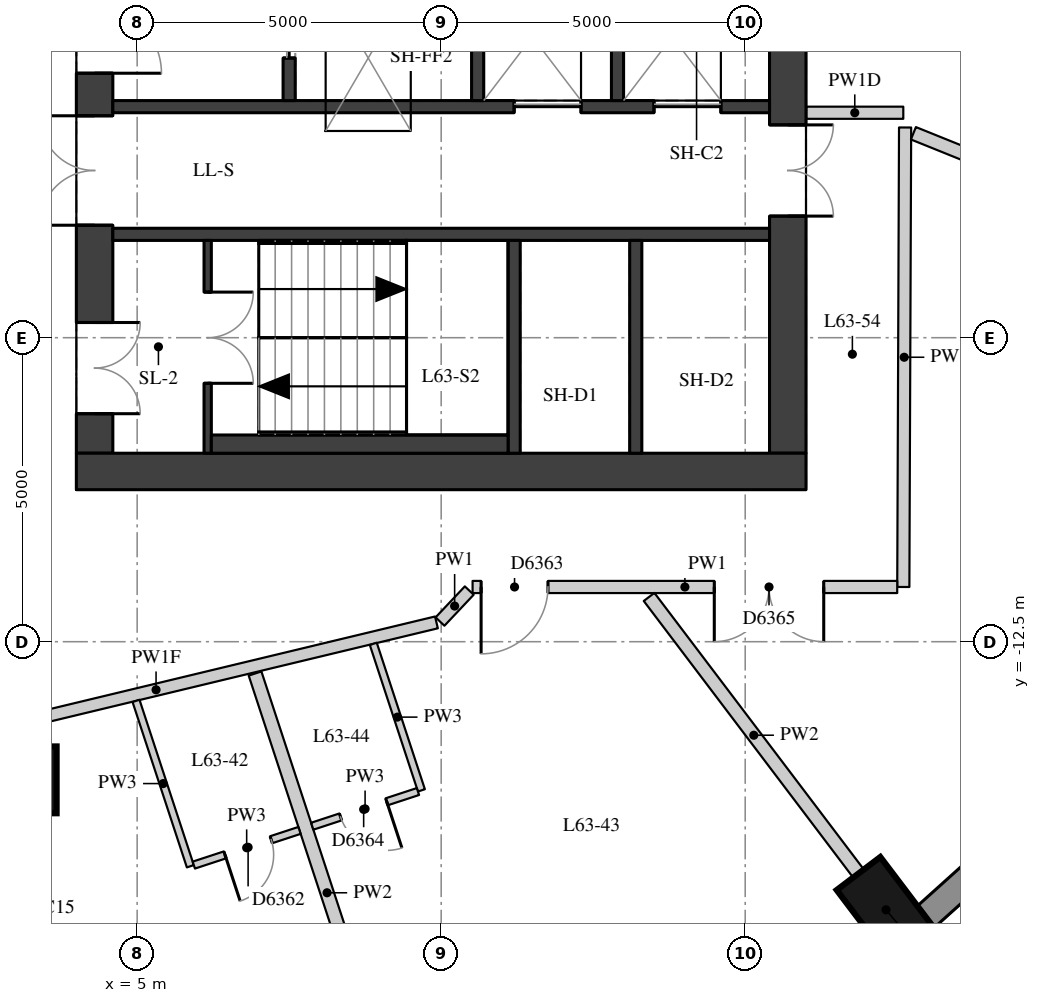
"""IFC4 building model, lengths in metres.
Left out: names, types, materials, properties, quantities, classifications, styles, units other than length and angle.
Written with IfcOpenShell. Run it as: python <this file> out.ifc"""

import sys

from ifc_helpers import new_model, si_unit, direction, frame, frame_2d, origin, origin_2d, place, context, subcontext, project, spatial, rectangle, extrude, element, fill, save


model = new_model("IFC4")
c1 = context("Model", 3, precision=1e-05, world=origin(), true_north=direction((0.0, 1.0)))
c2 = subcontext(c1, "Body", "Model", "MODEL_VIEW")
j1 = project(units=[si_unit("LENGTHUNIT", "METRE"), si_unit("PLANEANGLEUNIT", "RADIAN")], contexts=[c1])
p1 = place(None, origin())
s1 = spatial("IfcSite", under=j1, at=p1, CompositionType="ELEMENT")
p2 = place(p1, origin())
s2 = spatial("IfcBuilding", under=s1, at=p2, CompositionType="ELEMENT")
p3 = place(p2, frame((0.0, 0.0, 222.2)))
s3 = spatial("IfcBuildingStorey", under=s2, at=p3, CompositionType="ELEMENT", Elevation=222.2)
p4 = place(p3, frame((17.316, -16.911, 0.0), z_axis=(0.0, 0.0, 1.0), x_axis=(0.60360770772, -0.797281465469, 0.0)))
e1 = element("IfcColumn", 1, at=p4, inside=s3, PredefinedType="COLUMN", context=c2, shape_type="SweptSolid", body=[
    extrude(rectangle(XDim=1.5, YDim=0.9, at=origin_2d()), origin(), (0.0, 0.0, 1.0), 3.3),
])
p5 = place(p3, frame((3.126, -14.772, 0.0), z_axis=(0.0, 0.0, 1.0), x_axis=(1.0, 0.0, 0.0)))
e2 = element("IfcColumn", 2, at=p5, inside=s3, PredefinedType="COLUMN", context=c2, shape_type="SweptSolid", body=[
    extrude(rectangle(XDim=1.1, YDim=1.1, at=origin_2d()), origin(), (0.0, 0.0, 1.0), 3.3),
])
p6 = place(p3, frame((17.953, -17.04, 0.0), z_axis=(0.0, 0.0, 1.0), x_axis=(0.743442727602, 0.668799604348, 0.0)))
e3 = element("IfcWall", 3, at=p6, inside=s3, PredefinedType="SOLIDWALL", context=c2, shape_type="SweptSolid", body=[
    extrude(rectangle(XDim=3.513, YDim=0.45, at=frame_2d((1.756, 0.0))), origin(), (0.0, 0.0, 1.0), 3.02),
])
p7 = place(p3, frame((4.3, -9.4, 0.0), z_axis=(0.0, 0.0, 1.0), x_axis=(0.0, 1.0, 0.0)))
e4 = element("IfcWall", 4, at=p7, inside=s3, PredefinedType="SHEAR", context=c2, shape_type="SweptSolid", body=[
    extrude(rectangle(XDim=18.8, YDim=0.6, at=frame_2d((9.4, 0.0))), origin(), (0.0, 0.0, 1.0), 3.02),
])
p8 = place(p7, frame((0.65, 0.0, 0.0)))
e5 = element("IfcOpeningElement", 5, at=p8, cuts=e4, PredefinedType="OPENING", context=c2, shape_type="SweptSolid", body=[
    extrude(rectangle(XDim=1.5, YDim=2.1, at=frame_2d((0.75, 1.05))), frame((0.0, 0.31, 0.0), z_axis=(0.0, -1.0, 0.0), x_axis=(1.0, 0.0, 0.0)), (0.0, 0.0, 1.0), 0.62),
])
p9 = place(p7, frame((3.75, 0.0, 0.0)))
e6 = element("IfcOpeningElement", 6, at=p9, cuts=e4, PredefinedType="OPENING", context=c2, shape_type="SweptSolid", body=[
    extrude(rectangle(XDim=1.8, YDim=2.1, at=frame_2d((0.9, 1.05))), frame((0.0, 0.31, 0.0), z_axis=(0.0, -1.0, 0.0), x_axis=(1.0, 0.0, 0.0)), (0.0, 0.0, 1.0), 0.62),
])
p10 = place(p7, frame((6.25, 0.0, 0.0)))
e7 = element("IfcOpeningElement", 7, at=p10, cuts=e4, PredefinedType="OPENING", context=c2, shape_type="SweptSolid", body=[
    extrude(rectangle(XDim=1.1, YDim=2.1, at=frame_2d((0.55, 1.05))), frame((0.0, 0.31, 0.0), z_axis=(0.0, -1.0, 0.0), x_axis=(1.0, 0.0, 0.0)), (0.0, 0.0, 1.0), 0.62),
])
p11 = place(p7, frame((8.9, 0.0, 0.0)))
e8 = element("IfcOpeningElement", 8, at=p11, cuts=e4, PredefinedType="OPENING", context=c2, shape_type="SweptSolid", body=[
    extrude(rectangle(XDim=1.0, YDim=2.1, at=frame_2d((0.5, 1.05))), frame((0.0, 0.31, 0.0), z_axis=(0.0, -1.0, 0.0), x_axis=(1.0, 0.0, 0.0)), (0.0, 0.0, 1.0), 0.62),
])
p12 = place(p7, frame((11.45, 0.0, 0.0)))
e9 = element("IfcOpeningElement", 9, at=p12, cuts=e4, PredefinedType="OPENING", context=c2, shape_type="SweptSolid", body=[
    extrude(rectangle(XDim=1.1, YDim=2.1, at=frame_2d((0.55, 1.05))), frame((0.0, 0.31, 0.0), z_axis=(0.0, -1.0, 0.0), x_axis=(1.0, 0.0, 0.0)), (0.0, 0.0, 1.0), 0.62),
])
p13 = place(p7, frame((13.25, 0.0, 0.0)))
e10 = element("IfcOpeningElement", 10, at=p13, cuts=e4, PredefinedType="OPENING", context=c2, shape_type="SweptSolid", body=[
    extrude(rectangle(XDim=1.8, YDim=2.1, at=frame_2d((0.9, 1.05))), frame((0.0, 0.31, 0.0), z_axis=(0.0, -1.0, 0.0), x_axis=(1.0, 0.0, 0.0)), (0.0, 0.0, 1.0), 0.62),
])
p14 = place(p7, frame((16.65, 0.0, 0.0)))
e11 = element("IfcOpeningElement", 11, at=p14, cuts=e4, PredefinedType="OPENING", context=c2, shape_type="SweptSolid", body=[
    extrude(rectangle(XDim=1.5, YDim=2.1, at=frame_2d((0.75, 1.05))), frame((0.0, 0.31, 0.0), z_axis=(0.0, -1.0, 0.0), x_axis=(1.0, 0.0, 0.0)), (0.0, 0.0, 1.0), 0.62),
])
p15 = place(p3, frame((15.7, -9.4, 0.0), z_axis=(0.0, 0.0, 1.0), x_axis=(0.0, 1.0, 0.0)))
e12 = element("IfcWall", 12, at=p15, inside=s3, PredefinedType="SHEAR", context=c2, shape_type="SweptSolid", body=[
    extrude(rectangle(XDim=18.8, YDim=0.6, at=frame_2d((9.4, 0.0))), origin(), (0.0, 0.0, 1.0), 3.02),
])
p16 = place(p15, frame((13.4, 0.0, 0.0)))
e13 = element("IfcOpeningElement", 13, at=p16, cuts=e12, PredefinedType="OPENING", context=c2, shape_type="SweptSolid", body=[
    extrude(rectangle(XDim=1.5, YDim=2.1, at=frame_2d((0.75, 1.05))), frame((0.0, 0.31, 0.0), z_axis=(0.0, -1.0, 0.0), x_axis=(1.0, 0.0, 0.0)), (0.0, 0.0, 1.0), 0.62),
])
p17 = place(p15, frame((3.9, 0.0, 0.0)))
e14 = element("IfcOpeningElement", 14, at=p17, cuts=e12, PredefinedType="OPENING", context=c2, shape_type="SweptSolid", body=[
    extrude(rectangle(XDim=1.5, YDim=2.1, at=frame_2d((0.75, 1.05))), frame((0.0, 0.31, 0.0), z_axis=(0.0, -1.0, 0.0), x_axis=(1.0, 0.0, 0.0)), (0.0, 0.0, 1.0), 0.62),
])
p18 = place(p3, frame((4.0, -9.7, 0.0), z_axis=(0.0, 0.0, 1.0), x_axis=(1.0, 0.0, 0.0)))
e15 = element("IfcWall", 15, at=p18, inside=s3, PredefinedType="SHEAR", context=c2, shape_type="SweptSolid", body=[
    extrude(rectangle(XDim=12.0, YDim=0.6, at=frame_2d((6.0, 0.0))), origin(), (0.0, 0.0, 1.0), 3.02),
])
p19 = place(p3, frame((4.6, -3.7, 0.0), z_axis=(0.0, 0.0, 1.0), x_axis=(1.0, 0.0, 0.0)))
e16 = element("IfcWall", 16, at=p19, inside=s3, PredefinedType="SHEAR", context=c2, shape_type="SweptSolid", body=[
    extrude(rectangle(XDim=10.8, YDim=0.2, at=frame_2d((5.4, 0.0))), origin(), (0.0, 0.0, 1.0), 3.02),
])
p20 = place(p19, frame((6.6, 0.0, 0.0)))
e17 = element("IfcOpeningElement", 17, at=p20, cuts=e16, PredefinedType="OPENING", context=c2, shape_type="SweptSolid", body=[
    extrude(rectangle(XDim=1.1, YDim=2.1, at=frame_2d((0.55, 1.05))), frame((0.0, 0.11, 0.0), z_axis=(0.0, -1.0, 0.0), x_axis=(1.0, 0.0, 0.0)), (0.0, 0.0, 1.0), 0.22),
])
p21 = place(p19, frame((8.9, 0.0, 0.0)))
e18 = element("IfcOpeningElement", 18, at=p21, cuts=e16, PredefinedType="OPENING", context=c2, shape_type="SweptSolid", body=[
    extrude(rectangle(XDim=1.1, YDim=2.1, at=frame_2d((0.55, 1.05))), frame((0.0, 0.11, 0.0), z_axis=(0.0, -1.0, 0.0), x_axis=(1.0, 0.0, 0.0)), (0.0, 0.0, 1.0), 0.22),
])
p22 = place(p3, frame((4.6, -5.8, 0.0), z_axis=(0.0, 0.0, 1.0), x_axis=(1.0, 0.0, 0.0)))
e19 = element("IfcWall", 19, at=p22, inside=s3, PredefinedType="SHEAR", context=c2, shape_type="SweptSolid", body=[
    extrude(rectangle(XDim=10.8, YDim=0.2, at=frame_2d((5.4, 0.0))), origin(), (0.0, 0.0, 1.0), 3.02),
])
for number, where, z_axis, x_axis in (
    (20, (11.2, -9.4, 0.0), (0.0, 0.0, 1.0), (0.0, 1.0, 0.0)),
    (21, (13.2, -9.4, 0.0), (0.0, 0.0, 1.0), (0.0, 1.0, 0.0)),
):
    element("IfcWall", number, at=place(p3, frame(where, z_axis=z_axis, x_axis=x_axis)), inside=s3, PredefinedType="SHEAR", context=c2, shape_type="SweptSolid", body=[
        extrude(rectangle(XDim=3.5, YDim=0.2, at=frame_2d((1.75, 0.0))), origin(), (0.0, 0.0, 1.0), 3.02),
    ])
p23 = place(p3, frame((7.5, -3.6, 0.0), z_axis=(0.0, 0.0, 1.0), x_axis=(0.0, 1.0, 0.0)))
e22 = element("IfcWall", 22, at=p23, inside=s3, PredefinedType="SHEAR", context=c2, shape_type="SweptSolid", body=[
    extrude(rectangle(XDim=2.5, YDim=0.2, at=frame_2d((1.25, 0.0))), origin(), (0.0, 0.0, 1.0), 3.02),
])
p24 = place(p23, frame((0.7, 0.0, 0.0)))
e23 = element("IfcOpeningElement", 23, at=p24, cuts=e22, PredefinedType="OPENING", context=c2, shape_type="SweptSolid", body=[
    extrude(rectangle(XDim=1.1, YDim=2.1, at=frame_2d((0.55, 1.05))), frame((0.0, 0.11, 0.0), z_axis=(0.0, -1.0, 0.0), x_axis=(1.0, 0.0, 0.0)), (0.0, 0.0, 1.0), 0.22),
])
for number, where, z_axis, x_axis in (
    (24, (10.6, -3.6, 0.0), (0.0, 0.0, 1.0), (0.0, 1.0, 0.0)),
    (25, (12.9, -3.6, 0.0), (0.0, 0.0, 1.0), (0.0, 1.0, 0.0)),
):
    element("IfcWall", number, at=place(p3, frame(where, z_axis=z_axis, x_axis=x_axis)), inside=s3, PredefinedType="SHEAR", context=c2, shape_type="SweptSolid", body=[
        extrude(rectangle(XDim=2.5, YDim=0.2, at=frame_2d((1.25, 0.0))), origin(), (0.0, 0.0, 1.0), 3.02),
    ])
p25 = place(p3, frame((6.16, -9.4, 0.0), z_axis=(0.0, 0.0, 1.0), x_axis=(0.0, 1.0, 0.0)))
e26 = element("IfcWall", 26, at=p25, inside=s3, PredefinedType="SHEAR", context=c2, shape_type="SweptSolid", body=[
    extrude(rectangle(XDim=3.5, YDim=0.12, at=frame_2d((1.75, 0.0))), origin(), (0.0, 0.0, 1.0), 3.02),
])
p26 = place(p25, frame((1.15, 0.0, 0.0)))
e27 = element("IfcOpeningElement", 27, at=p26, cuts=e26, PredefinedType="OPENING", context=c2, shape_type="SweptSolid", body=[
    extrude(rectangle(XDim=1.5, YDim=2.1, at=frame_2d((0.75, 1.05))), frame((0.0, 0.07, 0.0), z_axis=(0.0, -1.0, 0.0), x_axis=(1.0, 0.0, 0.0)), (0.0, 0.0, 1.0), 0.14),
])
p27 = place(p3, frame((6.22, -9.25, 0.0), z_axis=(0.0, 0.0, 1.0), x_axis=(1.0, 0.0, 0.0)))
e28 = element("IfcWall", 28, at=p27, inside=s3, PredefinedType="PARTITIONING", context=c2, shape_type="SweptSolid", body=[
    extrude(rectangle(XDim=4.88, YDim=0.3, at=frame_2d((2.44, 0.0))), origin(), (0.0, 0.0, 1.0), 3.02),
])
p28 = place(p3, frame((17.63, -4.043, 0.0), z_axis=(0.0, 0.0, 1.0), x_axis=(-0.003908870153, -0.999992360338, 0.0)))
e29 = element("IfcWall", 29, at=p28, inside=s3, PredefinedType="PARTITIONING", context=c2, shape_type="SweptSolid", body=[
    extrude(rectangle(XDim=7.557, YDim=0.2, at=frame_2d((3.779, 0.0))), origin(), (0.0, 0.0, 1.0), 3.02),
])
p29 = place(p3, frame((17.5, -11.6, 0.0), z_axis=(0.0, 0.0, 1.0), x_axis=(-1.0, 0.0, 0.0)))
e30 = element("IfcWall", 30, at=p29, inside=s3, PredefinedType="PARTITIONING", context=c2, shape_type="SweptSolid", body=[
    extrude(rectangle(XDim=6.983, YDim=0.2, at=frame_2d((3.492, 0.0))), origin(), (0.0, 0.0, 1.0), 3.02),
])
p30 = place(p29, frame((5.743, 0.0, 0.0)))
e31 = element("IfcOpeningElement", 31, at=p30, cuts=e30, PredefinedType="OPENING", context=c2, shape_type="SweptSolid", body=[
    extrude(rectangle(XDim=1.1, YDim=2.1, at=frame_2d((0.55, 1.05))), frame((0.0, 0.11, 0.0), z_axis=(0.0, -1.0, 0.0), x_axis=(1.0, 0.0, 0.0)), (0.0, 0.0, 1.0), 0.22),
])
p31 = place(p29, frame((1.208, 0.0, 0.0)))
e32 = element("IfcOpeningElement", 32, at=p31, cuts=e30, PredefinedType="OPENING", context=c2, shape_type="SweptSolid", body=[
    extrude(rectangle(XDim=1.8, YDim=2.1, at=frame_2d((0.9, 1.05))), frame((0.0, 0.11, 0.0), z_axis=(0.0, -1.0, 0.0), x_axis=(1.0, 0.0, 0.0)), (0.0, 0.0, 1.0), 0.22),
])
p32 = place(p3, frame((10.462, -11.659, 0.0), z_axis=(0.0, 0.0, 1.0), x_axis=(-0.686265612426, -0.727351021998, 0.0)))
e33 = element("IfcWall", 33, at=p32, inside=s3, PredefinedType="PARTITIONING", context=c2, shape_type="SweptSolid", body=[
    extrude(rectangle(XDim=0.701, YDim=0.2, at=frame_2d((0.351, 0.0))), origin(), (0.0, 0.0, 1.0), 3.02),
])
p33 = place(p3, frame((9.922, -12.183, 0.0), z_axis=(0.0, 0.0, 1.0), x_axis=(-0.972292362394, -0.233768180104, 0.0)))
e34 = element("IfcWall", 34, at=p33, inside=s3, PredefinedType="PARTITIONING", context=c2, shape_type="SweptSolid", body=[
    extrude(rectangle(XDim=9.485, YDim=0.2, at=frame_2d((4.742, 0.0))), origin(), (0.0, 0.0, 1.0), 2.42),
])
p34 = place(p33, frame((8.245, 0.0, 0.0)))
e35 = element("IfcOpeningElement", 35, at=p34, cuts=e34, PredefinedType="OPENING", context=c2, shape_type="SweptSolid", body=[
    extrude(rectangle(XDim=1.1, YDim=2.1, at=frame_2d((0.55, 1.05))), frame((0.0, 0.11, 0.0), z_axis=(0.0, -1.0, 0.0), x_axis=(1.0, 0.0, 0.0)), (0.0, 0.0, 1.0), 0.22),
])
p35 = place(p3, frame((16.004, -3.8, 0.0), z_axis=(0.0, 0.0, 1.0), x_axis=(1.0, 0.0, 0.0)))
e36 = element("IfcWall", 36, at=p35, inside=s3, PredefinedType="PARTITIONING", context=c2, shape_type="SweptSolid", body=[
    extrude(rectangle(XDim=1.596, YDim=0.2, at=frame_2d((0.798, 0.0))), origin(), (0.0, 0.0, 1.0), 2.47),
])
p36 = place(p3, frame((9.307, -20.235, 0.0), z_axis=(0.0, 0.0, 1.0), x_axis=(-0.311979110549, 0.950088961404, 0.0)))
e37 = element("IfcWall", 37, at=p36, inside=s3, PredefinedType="PARTITIONING", context=c2, shape_type="SweptSolid", body=[
    extrude(rectangle(XDim=7.591, YDim=0.22, at=frame_2d((3.795, 0.0))), origin(), (0.0, 0.0, 1.0), 3.02),
])
p37 = place(p3, frame((16.863, -16.312, 0.0), z_axis=(0.0, 0.0, 1.0), x_axis=(-0.603636051313, 0.797260006243, 0.0)))
e38 = element("IfcWall", 38, at=p37, inside=s3, PredefinedType="PARTITIONING", context=c2, shape_type="SweptSolid", body=[
    extrude(rectangle(XDim=5.706, YDim=0.22, at=frame_2d((2.853, 0.0))), origin(), (0.0, 0.0, 1.0), 3.02),
])
p38 = place(p3, frame((24.295, -6.771, 0.0), z_axis=(0.0, 0.0, 1.0), x_axis=(-0.927386950843, 0.374103519639, 0.0)))
e39 = element("IfcWall", 39, at=p38, inside=s3, PredefinedType="PARTITIONING", context=c2, shape_type="SweptSolid", body=[
    extrude(rectangle(XDim=7.04, YDim=0.22, at=frame_2d((3.52, 0.0))), origin(), (0.0, 0.0, 1.0), 3.02),
])
p39 = place(p3, frame((4.981, -13.473, 0.0), z_axis=(0.0, 0.0, 1.0), x_axis=(0.312029038347, -0.950072565243, 0.0)))
e40 = element("IfcWall", 40, at=p39, inside=s3, PredefinedType="PARTITIONING", context=c2, shape_type="SweptSolid", body=[
    extrude(rectangle(XDim=2.863, YDim=0.12, at=frame_2d((1.431, 0.0))), origin(), (0.0, 0.0, 1.0), 3.02),
])
p40 = place(p3, frame((8.884, -12.535, 0.0), z_axis=(0.0, 0.0, 1.0), x_axis=(0.312037873477, -0.950069663507, 0.0)))
e41 = element("IfcWall", 41, at=p40, inside=s3, PredefinedType="PARTITIONING", context=c2, shape_type="SweptSolid", body=[
    extrude(rectangle(XDim=2.537, YDim=0.12, at=frame_2d((1.268, 0.0))), origin(), (0.0, 0.0, 1.0), 3.02),
])
p41 = place(p3, frame((5.932, -16.174, 0.0), z_axis=(0.0, 0.0, 1.0), x_axis=(0.950140787885, 0.311821235962, 0.0)))
e42 = element("IfcWall", 42, at=p41, inside=s3, PredefinedType="PARTITIONING", context=c2, shape_type="SweptSolid", body=[
    extrude(rectangle(XDim=1.83, YDim=0.12, at=frame_2d((0.915, 0.0))), origin(), (0.0, 0.0, 1.0), 3.02),
])
p42 = place(p41, frame((0.54, 0.0, 0.0)))
e43 = element("IfcOpeningElement", 43, at=p42, cuts=e42, PredefinedType="OPENING", context=c2, shape_type="SweptSolid", body=[
    extrude(rectangle(XDim=0.8, YDim=2.1, at=frame_2d((0.4, 1.05))), frame((0.0, 0.07, 0.0), z_axis=(0.0, -1.0, 0.0), x_axis=(1.0, 0.0, 0.0)), (0.0, 0.0, 1.0), 0.14),
])
p43 = place(p3, frame((9.618, -14.964, 0.0), z_axis=(0.0, 0.0, 1.0), x_axis=(-0.950140787885, -0.311821235962, 0.0)))
e44 = element("IfcWall", 44, at=p43, inside=s3, PredefinedType="PARTITIONING", context=c2, shape_type="SweptSolid", body=[
    extrude(rectangle(XDim=1.83, YDim=0.12, at=frame_2d((0.915, 0.0))), origin(), (0.0, 0.0, 1.0), 3.02),
])
p44 = place(p43, frame((0.54, 0.0, 0.0)))
e45 = element("IfcOpeningElement", 45, at=p44, cuts=e44, PredefinedType="OPENING", context=c2, shape_type="SweptSolid", body=[
    extrude(rectangle(XDim=0.8, YDim=2.1, at=frame_2d((0.4, 1.05))), frame((0.0, 0.07, 0.0), z_axis=(0.0, -1.0, 0.0), x_axis=(1.0, 0.0, 0.0)), (0.0, 0.0, 1.0), 0.14),
])
p45 = place(p8, origin())
e46 = element("IfcDoor", 46, at=p45, inside=s3, OperationType="DOUBLE_DOOR_SINGLE_SWING", PredefinedType="DOOR", context=c2, shape_type="SweptSolid", body=[
    extrude(rectangle(XDim=1.5, YDim=2.1, at=frame_2d((0.75, 1.05))), frame((0.0, 0.025, 0.0), z_axis=(0.0, -1.0, 0.0), x_axis=(1.0, 0.0, 0.0)), (0.0, 0.0, 1.0), 0.05),
])
fill(e5, e46)
p46 = place(p9, origin())
e47 = element("IfcDoor", 47, at=p46, inside=s3, OperationType="DOUBLE_DOOR_SINGLE_SWING", PredefinedType="DOOR", context=c2, shape_type="SweptSolid", body=[
    extrude(rectangle(XDim=1.8, YDim=2.1, at=frame_2d((0.9, 1.05))), frame((0.0, 0.025, 0.0), z_axis=(0.0, -1.0, 0.0), x_axis=(1.0, 0.0, 0.0)), (0.0, 0.0, 1.0), 0.05),
])
fill(e6, e47)
p47 = place(p10, origin())
e48 = element("IfcDoor", 48, at=p47, inside=s3, OperationType="SINGLE_SWING_RIGHT", PredefinedType="DOOR", context=c2, shape_type="SweptSolid", body=[
    extrude(rectangle(XDim=1.1, YDim=2.1, at=frame_2d((0.55, 1.05))), frame((0.0, 0.025, 0.0), z_axis=(0.0, -1.0, 0.0), x_axis=(1.0, 0.0, 0.0)), (0.0, 0.0, 1.0), 0.05),
])
fill(e7, e48)
p48 = place(p17, origin())
e49 = element("IfcDoor", 49, at=p48, inside=s3, OperationType="DOUBLE_DOOR_SINGLE_SWING", PredefinedType="DOOR", context=c2, shape_type="SweptSolid", body=[
    extrude(rectangle(XDim=1.5, YDim=2.1, at=frame_2d((0.75, 1.05))), frame((0.0, 0.025, 0.0), z_axis=(0.0, -1.0, 0.0), x_axis=(1.0, 0.0, 0.0)), (0.0, 0.0, 1.0), 0.05),
])
fill(e14, e49)
p49 = place(p26, origin())
e50 = element("IfcDoor", 50, at=p49, inside=s3, OperationType="DOUBLE_DOOR_SINGLE_SWING", PredefinedType="DOOR", context=c2, shape_type="SweptSolid", body=[
    extrude(rectangle(XDim=1.5, YDim=2.1, at=frame_2d((0.75, 1.05))), frame((0.0, 0.025, 0.0), z_axis=(0.0, -1.0, 0.0), x_axis=(1.0, 0.0, 0.0)), (0.0, 0.0, 1.0), 0.05),
])
fill(e27, e50)
p50 = place(p20, origin())
e51 = element("IfcDoor", 51, at=p50, inside=s3, OperationType="DOUBLE_DOOR_SLIDING", PredefinedType="DOOR", context=c2, shape_type="SweptSolid", body=[
    extrude(rectangle(XDim=1.1, YDim=2.1, at=frame_2d((0.55, 1.05))), frame((0.0, 0.025, 0.0), z_axis=(0.0, -1.0, 0.0), x_axis=(1.0, 0.0, 0.0)), (0.0, 0.0, 1.0), 0.05),
])
fill(e17, e51)
p51 = place(p21, origin())
e52 = element("IfcDoor", 52, at=p51, inside=s3, OperationType="DOUBLE_DOOR_SLIDING", PredefinedType="DOOR", context=c2, shape_type="SweptSolid", body=[
    extrude(rectangle(XDim=1.1, YDim=2.1, at=frame_2d((0.55, 1.05))), frame((0.0, 0.025, 0.0), z_axis=(0.0, -1.0, 0.0), x_axis=(1.0, 0.0, 0.0)), (0.0, 0.0, 1.0), 0.05),
])
fill(e18, e52)
p52 = place(p24, origin())
e53 = element("IfcDoor", 53, at=p52, inside=s3, OperationType="DOUBLE_DOOR_SLIDING", PredefinedType="DOOR", context=c2, shape_type="SweptSolid", body=[
    extrude(rectangle(XDim=1.1, YDim=2.1, at=frame_2d((0.55, 1.05))), frame((0.0, 0.025, 0.0), z_axis=(0.0, -1.0, 0.0), x_axis=(1.0, 0.0, 0.0)), (0.0, 0.0, 1.0), 0.05),
])
fill(e23, e53)
p53 = place(p42, origin())
e54 = element("IfcDoor", 54, at=p53, inside=s3, OperationType="SINGLE_SWING_RIGHT", PredefinedType="DOOR", context=c2, shape_type="SweptSolid", body=[
    extrude(rectangle(XDim=0.8, YDim=2.1, at=frame_2d((0.4, 1.05))), frame((0.0, 0.025, 0.0), z_axis=(0.0, -1.0, 0.0), x_axis=(1.0, 0.0, 0.0)), (0.0, 0.0, 1.0), 0.05),
])
fill(e43, e54)
p54 = place(p30, origin())
e55 = element("IfcDoor", 55, at=p54, inside=s3, OperationType="SINGLE_SWING_RIGHT", PredefinedType="DOOR", context=c2, shape_type="SweptSolid", body=[
    extrude(rectangle(XDim=1.1, YDim=2.1, at=frame_2d((0.55, 1.05))), frame((0.0, 0.025, 0.0), z_axis=(0.0, -1.0, 0.0), x_axis=(1.0, 0.0, 0.0)), (0.0, 0.0, 1.0), 0.05),
])
fill(e31, e55)
p55 = place(p44, origin())
e56 = element("IfcDoor", 56, at=p55, inside=s3, OperationType="SINGLE_SWING_LEFT", PredefinedType="DOOR", context=c2, shape_type="SweptSolid", body=[
    extrude(rectangle(XDim=0.8, YDim=2.1, at=frame_2d((0.4, 1.05))), frame((0.0, 0.025, 0.0), z_axis=(0.0, -1.0, 0.0), x_axis=(1.0, 0.0, 0.0)), (0.0, 0.0, 1.0), 0.05),
])
fill(e45, e56)
p56 = place(p31, origin())
e57 = element("IfcDoor", 57, at=p56, inside=s3, OperationType="DOUBLE_DOOR_SINGLE_SWING", PredefinedType="DOOR", context=c2, shape_type="SweptSolid", body=[
    extrude(rectangle(XDim=1.8, YDim=2.1, at=frame_2d((0.9, 1.05))), frame((0.0, 0.025, 0.0), z_axis=(0.0, -1.0, 0.0), x_axis=(1.0, 0.0, 0.0)), (0.0, 0.0, 1.0), 0.05),
])
fill(e32, e57)
save(model, sys.argv[1])
